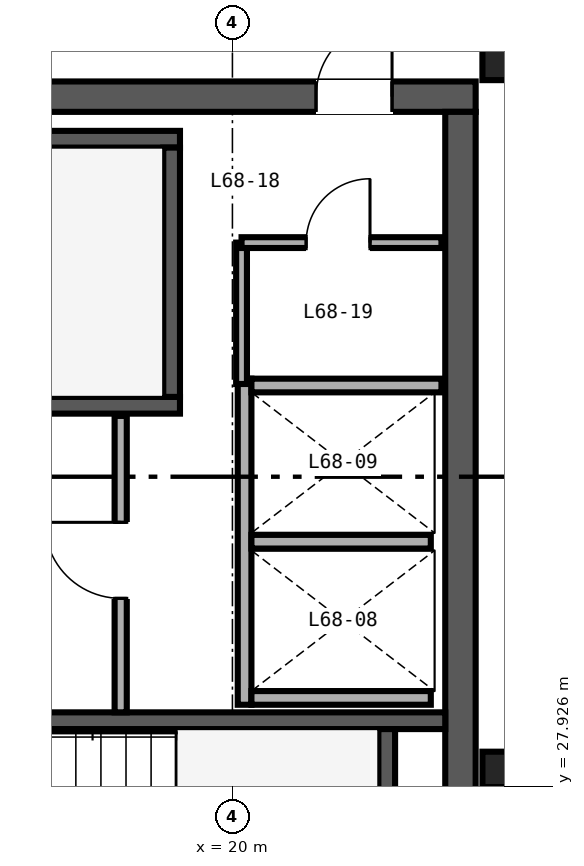
"""IFC4 building model, lengths in metres.
Left out: names, types, materials, properties, quantities, classifications, styles, units other than length and angle.
Written with IfcOpenShell. Run it as: python <this file> out.ifc"""

import sys

from ifc_helpers import new_model, si_unit, direction, frame, frame_2d, origin, origin_2d, place, context, subcontext, project, spatial, rectangle, i_section, extrude, source, transform, mapped, element, fill, save


model = new_model("IFC4")
c1 = context("Model", 3, precision=1e-05, world=origin(), true_north=direction((0.0, 1.0)))
c2 = subcontext(c1, "Body", "Model", "MODEL_VIEW")
j1 = project(units=[si_unit("LENGTHUNIT", "METRE"), si_unit("PLANEANGLEUNIT", "RADIAN")], contexts=[c1])
p1 = place(None, origin())
s1 = spatial("IfcSite", under=j1, at=p1, CompositionType="ELEMENT")
p2 = place(p1, origin())
s2 = spatial("IfcBuilding", under=s1, at=p2, CompositionType="ELEMENT")
p3 = place(p2, frame((0.0, 0.0, 268.8)))
s3 = spatial("IfcBuildingStorey", under=s2, at=p3, CompositionType="ELEMENT", Elevation=268.8)
p4 = place(p3, frame((10.8, 37.0, 0.0), z_axis=(0.0, 0.0, 1.0), x_axis=(1.0, 0.0, 0.0)))
e1 = element("IfcWall", 1, at=p4, inside=s3, PredefinedType="SHEAR", context=c2, shape_type="SweptSolid", body=[
    extrude(rectangle(XDim=12.4, YDim=0.4, at=frame_2d((6.2, 0.0))), origin(), (0.0, 0.0, 1.0), 3.28),
])
p5 = place(p4, frame((10.3, 0.0, 0.0)))
e2 = element("IfcOpeningElement", 2, at=p5, cuts=e1, PredefinedType="OPENING", context=c2, shape_type="SweptSolid", body=[
    extrude(rectangle(XDim=1.0, YDim=2.15, at=frame_2d((0.5, 1.075))), frame((0.0, 0.21, 0.0), z_axis=(0.0, -1.0, 0.0), x_axis=(1.0, 0.0, 0.0)), (0.0, 0.0, 1.0), 0.42),
])
p6 = place(p3, frame((23.0, 15.2, 0.0), z_axis=(0.0, 0.0, 1.0), x_axis=(0.0, 1.0, 0.0)))
e3 = element("IfcWall", 3, at=p6, inside=s3, PredefinedType="SHEAR", context=c2, shape_type="SweptSolid", body=[
    extrude(rectangle(XDim=21.6, YDim=0.4, at=frame_2d((10.8, 0.0))), origin(), (0.0, 0.0, 1.0), 3.28),
])
p7 = place(p3, frame((11.2, 32.94, 0.0), z_axis=(0.0, 0.0, 1.0), x_axis=(1.0, 0.0, 0.0)))
e4 = element("IfcWall", 4, at=p7, inside=s3, PredefinedType="SHEAR", context=c2, shape_type="SweptSolid", body=[
    extrude(rectangle(XDim=8.11, YDim=0.22, at=frame_2d((4.055, 0.0))), origin(), (0.0, 0.0, 1.0), 3.4),
])
p8 = place(p7, frame((0.72, 0.0, 0.0)))
e5 = element("IfcOpeningElement", 5, at=p8, cuts=e4, PredefinedType="OPENING", context=c2, shape_type="SweptSolid", body=[
    extrude(rectangle(XDim=1.05, YDim=2.15, at=frame_2d((0.525, 1.075))), frame((0.0, 0.12, 0.0), z_axis=(0.0, -1.0, 0.0), x_axis=(1.0, 0.0, 0.0)), (0.0, 0.0, 1.0), 0.24),
])
p9 = place(p3, frame((11.2, 36.44, 0.0), z_axis=(0.0, 0.0, 1.0), x_axis=(1.0, 0.0, 0.0)))
e6 = element("IfcWall", 6, at=p9, inside=s3, PredefinedType="SHEAR", context=c2, shape_type="SweptSolid", body=[
    extrude(rectangle(XDim=8.11, YDim=0.22, at=frame_2d((4.055, 0.0))), origin(), (0.0, 0.0, 1.0), 3.4),
])
p10 = place(p3, frame((19.2, 33.05, 0.0), z_axis=(0.0, 0.0, 1.0), x_axis=(0.0, 1.0, 0.0)))
e7 = element("IfcWall", 7, at=p10, inside=s3, PredefinedType="SHEAR", context=c2, shape_type="SweptSolid", body=[
    extrude(rectangle(XDim=3.28, YDim=0.22, at=frame_2d((1.64, 0.0))), origin(), (0.0, 0.0, 1.0), 3.4),
])
p11 = place(p3, frame((14.18, 28.79, 0.0), z_axis=(0.0, 0.0, 1.0), x_axis=(1.0, 0.0, 0.0)))
e8 = element("IfcWall", 8, at=p11, inside=s3, PredefinedType="SHEAR", context=c2, shape_type="SweptSolid", body=[
    extrude(rectangle(XDim=8.62, YDim=0.22, at=frame_2d((4.31, 0.0))), origin(), (0.0, 0.0, 1.0), 3.4),
])
p12 = place(p3, frame((22.03, 25.4, 0.0), z_axis=(0.0, 0.0, 1.0), x_axis=(0.0, 1.0, 0.0)))
e9 = element("IfcWall", 9, at=p12, inside=s3, PredefinedType="SHEAR", context=c2, shape_type="SweptSolid", body=[
    extrude(rectangle(XDim=3.28, YDim=0.22, at=frame_2d((1.64, 0.0))), origin(), (0.0, 0.0, 1.0), 3.4),
])
m1 = source(origin(), c2, "Body", "SweptSolid", [
    extrude(i_section(OverallWidth=0.422, OverallDepth=0.465, WebThickness=0.045, FlangeThickness=0.073, FilletRadius=0.025, at=origin_2d()), origin(), (0.0, 0.0, 1.0), 3.28),
])
for number, where, z_axis, x_axis in (
    (10, (23.5, 28.15, 0.0), (0.0, 0.0, 1.0), (1.0, 0.0, 0.0)),
    (11, (23.5, 37.45, 0.0), (0.0, 0.0, 1.0), (1.0, 0.0, 0.0)),
):
    element("IfcColumn", number, at=place(p3, frame(where, z_axis=z_axis, x_axis=x_axis)), inside=s3, PredefinedType="COLUMN", context=c2, shape_type="MappedRepresentation", body=[
        mapped(m1, transform((0.0, 0.0, 0.0), scale=1.0)),
    ])
p13 = place(p3, frame((20.16, 29.0, 0.0), z_axis=(0.0, 0.0, 1.0), x_axis=(0.0, 1.0, 0.0)))
e12 = element("IfcWall", 12, at=p13, inside=s3, PredefinedType="SOLIDWALL", context=c2, shape_type="SweptSolid", body=[
    extrude(rectangle(XDim=4.29, YDim=0.18, at=frame_2d((2.145, 0.0))), origin(), (0.0, 0.0, 1.0), 3.28),
])
p14 = place(p3, frame((20.25, 29.09, 0.0), z_axis=(0.0, 0.0, 1.0), x_axis=(1.0, 0.0, 0.0)))
e13 = element("IfcWall", 13, at=p14, inside=s3, PredefinedType="SOLIDWALL", context=c2, shape_type="SweptSolid", body=[
    extrude(rectangle(XDim=2.36, YDim=0.18, at=frame_2d((1.18, 0.0))), origin(), (0.0, 0.0, 1.0), 3.28),
])
p15 = place(p3, frame((20.25, 33.2, 0.0), z_axis=(0.0, 0.0, 1.0), x_axis=(1.0, 0.0, 0.0)))
e14 = element("IfcWall", 14, at=p15, inside=s3, PredefinedType="SOLIDWALL", context=c2, shape_type="SweptSolid", body=[
    extrude(rectangle(XDim=2.5, YDim=0.18, at=frame_2d((1.25, 0.0))), origin(), (0.0, 0.0, 1.0), 3.28),
])
p16 = place(p3, frame((20.25, 31.145, 0.0), z_axis=(0.0, 0.0, 1.0), x_axis=(1.0, 0.0, 0.0)))
e15 = element("IfcWall", 15, at=p16, inside=s3, PredefinedType="SOLIDWALL", context=c2, shape_type="SweptSolid", body=[
    extrude(rectangle(XDim=2.36, YDim=0.18, at=frame_2d((1.18, 0.0))), origin(), (0.0, 0.0, 1.0), 3.28),
])
p17 = place(p3, frame((18.53, 28.9, 0.0), z_axis=(0.0, 0.0, 1.0), x_axis=(0.0, 1.0, 0.0)))
e16 = element("IfcWall", 16, at=p17, inside=s3, PredefinedType="PARTITIONING", context=c2, shape_type="SweptSolid", body=[
    extrude(rectangle(XDim=3.9, YDim=0.16, at=frame_2d((1.95, 0.0))), origin(), (0.0, 0.0, 1.0), 3.28),
])
p18 = place(p17, frame((1.5, 0.0, 0.0)))
e17 = element("IfcOpeningElement", 17, at=p18, cuts=e16, PredefinedType="OPENING", context=c2, shape_type="SweptSolid", body=[
    extrude(rectangle(XDim=1.0, YDim=2.15, at=frame_2d((0.5, 1.075))), frame((0.0, 0.09, 0.0), z_axis=(0.0, -1.0, 0.0), x_axis=(1.0, 0.0, 0.0)), (0.0, 0.0, 1.0), 0.18),
])
p19 = place(p3, frame((20.12, 33.22, 0.0), z_axis=(0.0, 0.0, 1.0), x_axis=(0.0, 1.0, 0.0)))
e18 = element("IfcWall", 18, at=p19, inside=s3, PredefinedType="PARTITIONING", context=c2, shape_type="SweptSolid", body=[
    extrude(rectangle(XDim=1.86, YDim=0.142, at=frame_2d((0.93, 0.0))), origin(), (0.0, 0.0, 1.0), 3.28),
])
p20 = place(p3, frame((20.12, 35.08, 0.0), z_axis=(0.0, 0.0, 1.0), x_axis=(1.0, 0.0, 0.0)))
e19 = element("IfcWall", 19, at=p20, inside=s3, PredefinedType="PARTITIONING", context=c2, shape_type="SweptSolid", body=[
    extrude(rectangle(XDim=2.63, YDim=0.142, at=frame_2d((1.315, 0.0))), origin(), (0.0, 0.0, 1.0), 3.28),
])
p21 = place(p20, frame((0.85, 0.0, 0.0)))
e20 = element("IfcOpeningElement", 20, at=p21, cuts=e19, PredefinedType="OPENING", context=c2, shape_type="SweptSolid", body=[
    extrude(rectangle(XDim=0.84, YDim=2.1, at=frame_2d((0.42, 1.05))), frame((0.0, 0.081, 0.0), z_axis=(0.0, -1.0, 0.0), x_axis=(1.0, 0.0, 0.0)), (0.0, 0.0, 1.0), 0.162),
])
m2 = source(origin(), c2, "Body", "SweptSolid", [
    extrude(rectangle(XDim=1.0, YDim=2.15, at=frame_2d((0.5, 1.075))), frame((0.0, 0.025, 0.0), z_axis=(0.0, -1.0, 0.0), x_axis=(1.0, 0.0, 0.0)), (0.0, 0.0, 1.0), 0.05),
])
p22 = place(p18, origin())
e21 = element("IfcDoor", 21, at=p22, inside=s3, OperationType="SINGLE_SWING_RIGHT", PredefinedType="DOOR", context=c2, shape_type="MappedRepresentation", body=[
    mapped(m2, transform((0.0, 0.0, 0.0), scale=1.0)),
])
fill(e17, e21)
m3 = source(origin(), c2, "Body", "SweptSolid", [
    extrude(rectangle(XDim=0.84, YDim=2.1, at=frame_2d((0.42, 1.05))), frame((0.0, 0.025, 0.0), z_axis=(0.0, -1.0, 0.0), x_axis=(1.0, 0.0, 0.0)), (0.0, 0.0, 1.0), 0.05),
])
p23 = place(p21, origin())
e22 = element("IfcDoor", 22, at=p23, inside=s3, OperationType="SINGLE_SWING_RIGHT", PredefinedType="DOOR", context=c2, shape_type="MappedRepresentation", body=[
    mapped(m3, transform((0.0, 0.0, 0.0), scale=1.0)),
])
fill(e20, e22)
p24 = place(p5, origin())
e23 = element("IfcDoor", 23, at=p24, inside=s3, OperationType="SINGLE_SWING_RIGHT", PredefinedType="DOOR", context=c2, shape_type="MappedRepresentation", body=[
    mapped(m2, transform((0.0, 0.0, 0.0), scale=1.0)),
])
fill(e2, e23)
save(model, sys.argv[1])
